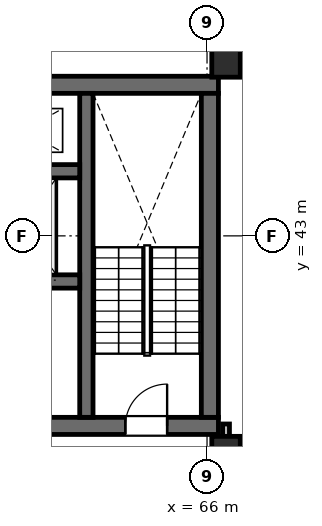
"""IFC4 building model, lengths in metres.
Left out: names, types, materials, properties, quantities, classifications, styles, units other than length and angle.
Written with IfcOpenShell. Run it as: python <this file> out.ifc"""

import sys

from ifc_helpers import new_model, si_unit, direction, frame, frame_2d, origin, origin_2d, place, context, subcontext, project, spatial, rectangle, extrude, element, fill, save


model = new_model("IFC4")
c1 = context("Model", 3, precision=1e-05, world=origin(), true_north=direction((0.0, 1.0)))
c2 = subcontext(c1, "Body", "Model", "MODEL_VIEW")
j1 = project(units=[si_unit("LENGTHUNIT", "METRE"), si_unit("PLANEANGLEUNIT", "RADIAN")], contexts=[c1])
p1 = place(None, origin())
s1 = spatial("IfcSite", under=j1, at=p1, CompositionType="ELEMENT")
p2 = place(p1, origin())
s2 = spatial("IfcBuilding", under=s1, at=p2, CompositionType="ELEMENT")
p3 = place(p2, frame((0.0, 0.0, 234.6)))
s3 = spatial("IfcBuildingStorey", under=s2, at=p3, CompositionType="ELEMENT", Elevation=234.6)
p4 = place(p3, frame((22.9, 46.975, 0.0), z_axis=(0.0, 0.0, 1.0), x_axis=(1.0, 0.0, 0.0)))
e1 = element("IfcWall", 1, at=p4, inside=s3, PredefinedType="SHEAR", context=c2, shape_type="SweptSolid", body=[
    extrude(rectangle(XDim=43.4, YDim=0.45, at=frame_2d((21.7, 0.0))), origin(), (0.0, 0.0, 1.0), 3.6),
])
p5 = place(p3, frame((55.8, 38.0, 0.0), z_axis=(0.0, 0.0, 1.0), x_axis=(1.0, 0.0, 0.0)))
e2 = element("IfcWall", 2, at=p5, inside=s3, PredefinedType="SHEAR", context=c2, shape_type="SweptSolid", body=[
    extrude(rectangle(XDim=10.5, YDim=0.45, at=frame_2d((5.25, 0.0))), origin(), (0.0, 0.0, 1.0), 3.6),
])
p6 = place(p5, frame((1.5, 0.0, 0.0)))
e3 = element("IfcOpeningElement", 3, at=p6, cuts=e2, PredefinedType="OPENING", context=c2, shape_type="SweptSolid", body=[
    extrude(rectangle(XDim=1.1, YDim=2.2, at=frame_2d((0.55, 1.1))), frame((0.0, 0.235, 0.0), z_axis=(0.0, -1.0, 0.0), x_axis=(1.0, 0.0, 0.0)), (0.0, 0.0, 1.0), 0.47),
])
p7 = place(p5, frame((4.82, 0.0, 0.0)))
e4 = element("IfcOpeningElement", 4, at=p7, cuts=e2, PredefinedType="OPENING", context=c2, shape_type="SweptSolid", body=[
    extrude(rectangle(XDim=1.0, YDim=2.15, at=frame_2d((0.5, 1.075))), frame((0.0, 0.235, 0.0), z_axis=(0.0, -1.0, 0.0), x_axis=(1.0, 0.0, 0.0)), (0.0, 0.0, 1.0), 0.47),
])
p8 = place(p5, frame((8.05, 0.0, 0.0)))
e5 = element("IfcOpeningElement", 5, at=p8, cuts=e2, PredefinedType="OPENING", context=c2, shape_type="SweptSolid", body=[
    extrude(rectangle(XDim=1.1, YDim=2.2, at=frame_2d((0.55, 1.1))), frame((0.0, 0.235, 0.0), z_axis=(0.0, -1.0, 0.0), x_axis=(1.0, 0.0, 0.0)), (0.0, 0.0, 1.0), 0.47),
])
p9 = place(p3, frame((66.075, 38.225, 0.0), z_axis=(0.0, 0.0, 1.0), x_axis=(0.0, 1.0, 0.0)))
e6 = element("IfcWall", 6, at=p9, inside=s3, PredefinedType="SHEAR", context=c2, shape_type="SweptSolid", body=[
    extrude(rectangle(XDim=8.525, YDim=0.45, at=frame_2d((4.262, 0.0))), origin(), (0.0, 0.0, 1.0), 3.6),
])
p10 = place(p3, frame((62.825, 38.225, 0.0), z_axis=(0.0, 0.0, 1.0), x_axis=(0.0, 1.0, 0.0)))
e7 = element("IfcWall", 7, at=p10, inside=s3, PredefinedType="SHEAR", context=c2, shape_type="SweptSolid", body=[
    extrude(rectangle(XDim=8.525, YDim=0.35, at=frame_2d((4.262, 0.0))), origin(), (0.0, 0.0, 1.0), 3.6),
])
p11 = place(p3, frame((59.6, 41.8, 0.0), z_axis=(0.0, 0.0, 1.0), x_axis=(1.0, 0.0, 0.0)))
e8 = element("IfcWall", 8, at=p11, inside=s3, PredefinedType="SHEAR", context=c2, shape_type="SweptSolid", body=[
    extrude(rectangle(XDim=3.05, YDim=0.35, at=frame_2d((1.525, 0.0))), origin(), (0.0, 0.0, 1.0), 3.6),
])
p12 = place(p11, frame((0.92, 0.0, 0.0)))
e9 = element("IfcOpeningElement", 9, at=p12, cuts=e8, PredefinedType="OPENING", context=c2, shape_type="SweptSolid", body=[
    extrude(rectangle(XDim=1.2, YDim=2.2, at=frame_2d((0.6, 1.1))), frame((0.0, 0.185, 0.0), z_axis=(0.0, -1.0, 0.0), x_axis=(1.0, 0.0, 0.0)), (0.0, 0.0, 1.0), 0.37),
])
p13 = place(p3, frame((59.6, 44.7, 0.0), z_axis=(0.0, 0.0, 1.0), x_axis=(1.0, 0.0, 0.0)))
e10 = element("IfcWall", 10, at=p13, inside=s3, PredefinedType="SHEAR", context=c2, shape_type="SweptSolid", body=[
    extrude(rectangle(XDim=3.05, YDim=0.35, at=frame_2d((1.525, 0.0))), origin(), (0.0, 0.0, 1.0), 3.6),
])
for number, where, z_axis, x_axis in (
    (11, (66.5, 47.55, 0.0), (0.0, 0.0, 1.0), (1.0, 0.0, 0.0)),
    (12, (66.5, 37.35, 0.0), (0.0, 0.0, 1.0), (1.0, 0.0, 0.0)),
):
    element("IfcColumn", number, at=place(p3, frame(where, z_axis=z_axis, x_axis=x_axis)), inside=s3, PredefinedType="COLUMN", context=c2, shape_type="SweptSolid", body=[
        extrude(rectangle(XDim=0.75, YDim=0.75, at=origin_2d()), origin(), (0.0, 0.0, 1.0), 3.6),
    ])
p14 = place(p3, frame((68.375, 37.8, 0.0), z_axis=(0.0, 0.0, 1.0), x_axis=(-0.139164922175, -0.99026921816, 0.0)))
e13 = element("IfcWall", 13, at=p14, inside=s3, PredefinedType="STANDARD", context=c2, shape_type="SweptSolid", body=[
    extrude(rectangle(XDim=19.347, YDim=0.28, at=frame_2d((9.673, 0.0))), origin(), (0.0, 0.0, 1.0), 3.36),
])
p15 = place(p14, frame((8.44, 0.0, 0.0)))
e14 = element("IfcOpeningElement", 14, at=p15, cuts=e13, PredefinedType="OPENING", context=c2, shape_type="SweptSolid", body=[
    extrude(rectangle(XDim=1.0, YDim=2.15, at=frame_2d((0.5, 1.075))), frame((0.0, 0.15, 0.0), z_axis=(0.0, -1.0, 0.0), x_axis=(1.0, 0.0, 0.0)), (0.0, 0.0, 1.0), 0.3),
])
p16 = place(p14, frame((3.971, 0.0, 0.65)))
e15 = element("IfcOpeningElement", 15, at=p16, cuts=e13, PredefinedType="OPENING", context=c2, shape_type="SweptSolid", body=[
    extrude(rectangle(XDim=1.8, YDim=2.1, at=frame_2d((0.9, 1.05))), frame((0.0, 0.15, 0.0), z_axis=(0.0, -1.0, 0.0), x_axis=(1.0, 0.0, 0.0)), (0.0, 0.0, 1.0), 0.3),
])
p17 = place(p14, frame((12.975, 0.0, 0.65)))
e16 = element("IfcOpeningElement", 16, at=p17, cuts=e13, PredefinedType="OPENING", context=c2, shape_type="SweptSolid", body=[
    extrude(rectangle(XDim=1.8, YDim=2.1, at=frame_2d((0.9, 1.05))), frame((0.0, 0.15, 0.0), z_axis=(0.0, -1.0, 0.0), x_axis=(1.0, 0.0, 0.0)), (0.0, 0.0, 1.0), 0.3),
])
p18 = place(p3, frame((66.5, 34.468, 0.0), z_axis=(0.0, 0.0, 1.0), x_axis=(0.0, 1.0, 0.0)))
e17 = element("IfcWall", 17, at=p18, inside=s3, PredefinedType="STANDARD", context=c2, shape_type="SweptSolid", body=[
    extrude(rectangle(XDim=3.582, YDim=0.18, at=frame_2d((1.791, 0.0))), origin(), (0.0, 0.0, 1.0), 2.664),
])
p19 = place(p8, origin())
e18 = element("IfcDoor", 18, at=p19, inside=s3, OperationType="SINGLE_SWING_RIGHT", PredefinedType="DOOR", context=c2, shape_type="SweptSolid", body=[
    extrude(rectangle(XDim=1.1, YDim=2.2, at=frame_2d((0.55, 1.1))), frame((0.0, 0.025, 0.0), z_axis=(0.0, -1.0, 0.0), x_axis=(1.0, 0.0, 0.0)), (0.0, 0.0, 1.0), 0.05),
])
fill(e5, e18)
save(model, sys.argv[1])
